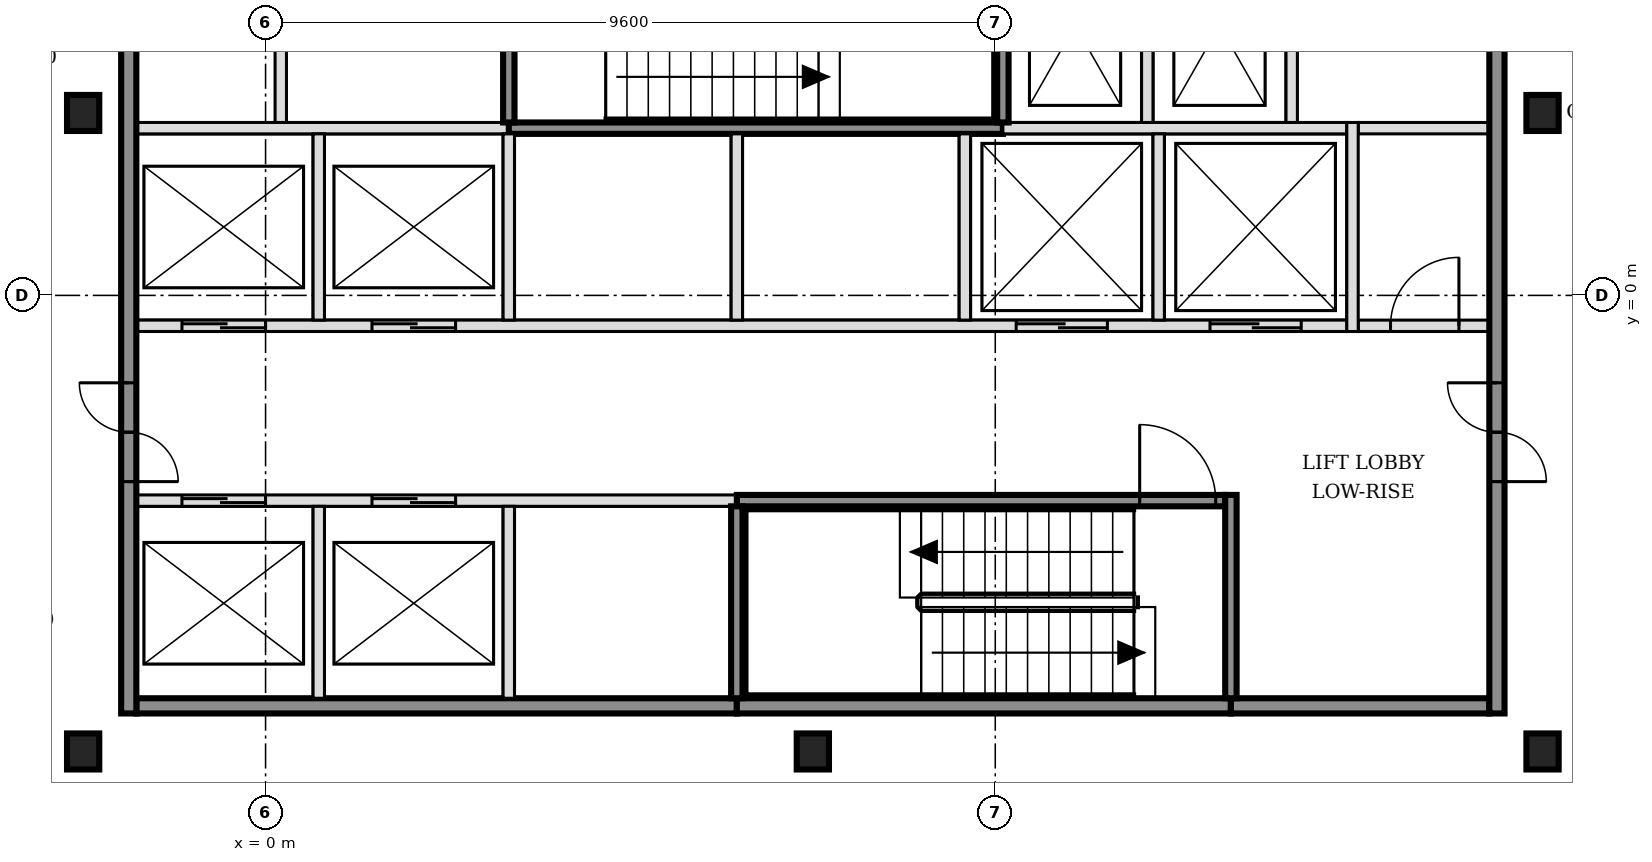
"""IFC4 building model, lengths in metres.
Left out: names, types, materials, properties, quantities, classifications, styles, units other than length and angle.
Written with IfcOpenShell. Run it as: python <this file> out.ifc"""

import sys

from ifc_helpers import new_model, si_unit, direction, frame, frame_2d, origin, origin_2d, place, context, subcontext, project, spatial, rectangle, i_section, extrude, element, fill, save


model = new_model("IFC4")
c1 = context("Model", 3, precision=1e-05, world=origin(), true_north=direction((0.0, 1.0)))
c2 = subcontext(c1, "Body", "Model", "MODEL_VIEW")
j1 = project(units=[si_unit("LENGTHUNIT", "METRE"), si_unit("PLANEANGLEUNIT", "RADIAN")], contexts=[c1])
p1 = place(None, origin())
s1 = spatial("IfcSite", under=j1, at=p1, CompositionType="ELEMENT")
p2 = place(p1, origin())
s2 = spatial("IfcBuilding", under=s1, at=p2, CompositionType="ELEMENT")
p3 = place(p2, frame((0.0, 0.0, 112.2)))
s3 = spatial("IfcBuildingStorey", under=s2, at=p3, CompositionType="ELEMENT", Elevation=112.2)
for number, where, z_axis, x_axis in (
    (1, (-2.4, -6.0, -0.15), (0.0, 0.0, 1.0), (1.0, 0.0, 0.0)),
    (2, (7.2, -6.0, -0.15), (0.0, 0.0, 1.0), (1.0, 0.0, 0.0)),
    (3, (16.8, -6.0, -0.15), (0.0, 0.0, 1.0), (1.0, 0.0, 0.0)),
    (4, (-2.4, 2.4, -0.15), (0.0, 0.0, 1.0), (1.0, 0.0, 0.0)),
    (5, (16.8, 2.4, -0.15), (0.0, 0.0, 1.0), (1.0, 0.0, 0.0)),
):
    element("IfcColumn", number, at=place(p3, frame(where, z_axis=z_axis, x_axis=x_axis)), inside=s3, PredefinedType="COLUMN", context=c2, shape_type="SweptSolid", body=[
        extrude(i_section(OverallWidth=0.424, OverallDepth=0.474, WebThickness=0.048, FlangeThickness=0.077, FilletRadius=0.015, at=origin_2d()), origin(), (0.0, 0.0, 1.0), 3.6),
    ])
p4 = place(p3, frame((-1.7, -5.4, 0.0), z_axis=(0.0, 0.0, 1.0), x_axis=(1.0, 0.0, 0.0)))
e6 = element("IfcWall", 6, at=p4, inside=s3, PredefinedType="SOLIDWALL", context=c2, shape_type="SweptSolid", body=[
    extrude(rectangle(XDim=7.9, YDim=0.2, at=frame_2d((3.95, 0.0))), origin(), (0.0, 0.0, 1.0), 3.45),
])
p5 = place(p3, frame((6.2, -5.4, 0.0), z_axis=(0.0, 0.0, 1.0), x_axis=(1.0, 0.0, 0.0)))
e7 = element("IfcWall", 7, at=p5, inside=s3, PredefinedType="SOLIDWALL", context=c2, shape_type="SweptSolid", body=[
    extrude(rectangle(XDim=6.5, YDim=0.2, at=frame_2d((3.25, 0.0))), origin(), (0.0, 0.0, 1.0), 3.45),
])
p6 = place(p3, frame((12.7, -5.4, 0.0), z_axis=(0.0, 0.0, 1.0), x_axis=(1.0, 0.0, 0.0)))
e8 = element("IfcWall", 8, at=p6, inside=s3, PredefinedType="SOLIDWALL", context=c2, shape_type="SweptSolid", body=[
    extrude(rectangle(XDim=3.4, YDim=0.2, at=frame_2d((1.7, 0.0))), origin(), (0.0, 0.0, 1.0), 3.45),
])
p7 = place(p3, frame((-1.7, -2.7, 0.0), z_axis=(0.0, 0.0, 1.0), x_axis=(1.0, 0.0, 0.0)))
e9 = element("IfcWall", 9, at=p7, inside=s3, PredefinedType="SOLIDWALL", context=c2, shape_type="SweptSolid", body=[
    extrude(rectangle(XDim=7.9, YDim=0.15, at=frame_2d((3.95, 0.0))), origin(), (0.0, 0.0, 1.0), 3.45),
])
p8 = place(p7, frame((0.6, 0.0, 0.0)))
e10 = element("IfcOpeningElement", 10, at=p8, cuts=e9, PredefinedType="OPENING", context=c2, shape_type="SweptSolid", body=[
    extrude(rectangle(XDim=1.1, YDim=2.1, at=frame_2d((0.55, 1.05))), frame((0.0, 0.085, 0.0), z_axis=(0.0, -1.0, 0.0), x_axis=(1.0, 0.0, 0.0)), (0.0, 0.0, 1.0), 0.17),
])
p9 = place(p7, frame((3.1, 0.0, 0.0)))
e11 = element("IfcOpeningElement", 11, at=p9, cuts=e9, PredefinedType="OPENING", context=c2, shape_type="SweptSolid", body=[
    extrude(rectangle(XDim=1.1, YDim=2.1, at=frame_2d((0.55, 1.05))), frame((0.0, 0.085, 0.0), z_axis=(0.0, -1.0, 0.0), x_axis=(1.0, 0.0, 0.0)), (0.0, 0.0, 1.0), 0.17),
])
p10 = place(p3, frame((6.2, -2.7, 0.0), z_axis=(0.0, 0.0, 1.0), x_axis=(1.0, 0.0, 0.0)))
e12 = element("IfcWall", 12, at=p10, inside=s3, PredefinedType="SOLIDWALL", context=c2, shape_type="SweptSolid", body=[
    extrude(rectangle(XDim=6.425, YDim=0.15, at=frame_2d((3.212, 0.0))), origin(), (0.0, 0.0, 1.0), 3.45),
])
p11 = place(p10, frame((5.3, 0.0, 0.0)))
e13 = element("IfcOpeningElement", 13, at=p11, cuts=e12, PredefinedType="OPENING", context=c2, shape_type="SweptSolid", body=[
    extrude(rectangle(XDim=1.0, YDim=2.1, at=frame_2d((0.5, 1.05))), frame((0.0, 0.085, 0.0), z_axis=(0.0, -1.0, 0.0), x_axis=(1.0, 0.0, 0.0)), (0.0, 0.0, 1.0), 0.17),
])
p12 = place(p3, frame((-1.7, -0.4, 0.0), z_axis=(0.0, 0.0, 1.0), x_axis=(1.0, 0.0, 0.0)))
e14 = element("IfcWall", 14, at=p12, inside=s3, PredefinedType="SOLIDWALL", context=c2, shape_type="SweptSolid", body=[
    extrude(rectangle(XDim=15.925, YDim=0.15, at=frame_2d((7.962, 0.0))), origin(), (0.0, 0.0, 1.0), 3.45),
])
p13 = place(p12, frame((0.6, 0.0, 0.0)))
e15 = element("IfcOpeningElement", 15, at=p13, cuts=e14, PredefinedType="OPENING", context=c2, shape_type="SweptSolid", body=[
    extrude(rectangle(XDim=1.1, YDim=2.1, at=frame_2d((0.55, 1.05))), frame((0.0, 0.085, 0.0), z_axis=(0.0, -1.0, 0.0), x_axis=(1.0, 0.0, 0.0)), (0.0, 0.0, 1.0), 0.17),
])
p14 = place(p12, frame((3.1, 0.0, 0.0)))
e16 = element("IfcOpeningElement", 16, at=p14, cuts=e14, PredefinedType="OPENING", context=c2, shape_type="SweptSolid", body=[
    extrude(rectangle(XDim=1.1, YDim=2.1, at=frame_2d((0.55, 1.05))), frame((0.0, 0.085, 0.0), z_axis=(0.0, -1.0, 0.0), x_axis=(1.0, 0.0, 0.0)), (0.0, 0.0, 1.0), 0.17),
])
p15 = place(p12, frame((11.575, 0.0, 0.0)))
e17 = element("IfcOpeningElement", 17, at=p15, cuts=e14, PredefinedType="OPENING", context=c2, shape_type="SweptSolid", body=[
    extrude(rectangle(XDim=1.2, YDim=2.1, at=frame_2d((0.6, 1.05))), frame((0.0, 0.085, 0.0), z_axis=(0.0, -1.0, 0.0), x_axis=(1.0, 0.0, 0.0)), (0.0, 0.0, 1.0), 0.17),
])
p16 = place(p12, frame((14.125, 0.0, 0.0)))
e18 = element("IfcOpeningElement", 18, at=p16, cuts=e14, PredefinedType="OPENING", context=c2, shape_type="SweptSolid", body=[
    extrude(rectangle(XDim=1.2, YDim=2.1, at=frame_2d((0.6, 1.05))), frame((0.0, 0.085, 0.0), z_axis=(0.0, -1.0, 0.0), x_axis=(1.0, 0.0, 0.0)), (0.0, 0.0, 1.0), 0.17),
])
p17 = place(p3, frame((14.375, -0.4, 0.0), z_axis=(0.0, 0.0, 1.0), x_axis=(1.0, 0.0, 0.0)))
e19 = element("IfcWall", 19, at=p17, inside=s3, PredefinedType="PARTITIONING", context=c2, shape_type="SweptSolid", body=[
    extrude(rectangle(XDim=1.725, YDim=0.15, at=frame_2d((0.863, 0.0))), origin(), (0.0, 0.0, 1.0), 3.45),
])
p18 = place(p17, frame((0.425, 0.0, 0.0)))
e20 = element("IfcOpeningElement", 20, at=p18, cuts=e19, PredefinedType="OPENING", context=c2, shape_type="SweptSolid", body=[
    extrude(rectangle(XDim=0.9, YDim=2.1, at=frame_2d((0.45, 1.05))), frame((0.0, 0.085, 0.0), z_axis=(0.0, -1.0, 0.0), x_axis=(1.0, 0.0, 0.0)), (0.0, 0.0, 1.0), 0.17),
])
p19 = place(p3, frame((-1.7, 2.2, 0.0), z_axis=(0.0, 0.0, 1.0), x_axis=(1.0, 0.0, 0.0)))
e21 = element("IfcWall", 21, at=p19, inside=s3, PredefinedType="SOLIDWALL", context=c2, shape_type="SweptSolid", body=[
    extrude(rectangle(XDim=4.9, YDim=0.15, at=frame_2d((2.45, 0.0))), origin(), (0.0, 0.0, 1.0), 3.45),
])
p20 = place(p3, frame((3.2, 2.2, 0.0), z_axis=(0.0, 0.0, 1.0), x_axis=(1.0, 0.0, 0.0)))
e22 = element("IfcWall", 22, at=p20, inside=s3, PredefinedType="SOLIDWALL", context=c2, shape_type="SweptSolid", body=[
    extrude(rectangle(XDim=6.5, YDim=0.15, at=frame_2d((3.25, 0.0))), origin(), (0.0, 0.0, 1.0), 3.45),
])
p21 = place(p3, frame((9.7, 2.2, 0.0), z_axis=(0.0, 0.0, 1.0), x_axis=(1.0, 0.0, 0.0)))
e23 = element("IfcWall", 23, at=p21, inside=s3, PredefinedType="SOLIDWALL", context=c2, shape_type="SweptSolid", body=[
    extrude(rectangle(XDim=4.525, YDim=0.15, at=frame_2d((2.263, 0.0))), origin(), (0.0, 0.0, 1.0), 3.45),
])
p22 = place(p3, frame((14.375, 2.2, 0.0), z_axis=(0.0, 0.0, 1.0), x_axis=(1.0, 0.0, 0.0)))
e24 = element("IfcWall", 24, at=p22, inside=s3, PredefinedType="PARTITIONING", context=c2, shape_type="SweptSolid", body=[
    extrude(rectangle(XDim=1.725, YDim=0.15, at=frame_2d((0.863, 0.0))), origin(), (0.0, 0.0, 1.0), 3.45),
])
p23 = place(p3, frame((-1.8, -5.5, 0.0), z_axis=(0.0, 0.0, 1.0), x_axis=(0.0, 1.0, 0.0)))
e25 = element("IfcWall", 25, at=p23, inside=s3, PredefinedType="SOLIDWALL", context=c2, shape_type="SweptSolid", body=[
    extrude(rectangle(XDim=15.8, YDim=0.2, at=frame_2d((7.9, 0.0))), origin(), (0.0, 0.0, 1.0), 3.45),
])
p24 = place(p23, frame((3.05, 0.0, 0.0)))
e26 = element("IfcOpeningElement", 26, at=p24, cuts=e25, PredefinedType="OPENING", context=c2, shape_type="SweptSolid", body=[
    extrude(rectangle(XDim=1.3, YDim=2.1, at=frame_2d((0.65, 1.05))), frame((0.0, 0.11, 0.0), z_axis=(0.0, -1.0, 0.0), x_axis=(1.0, 0.0, 0.0)), (0.0, 0.0, 1.0), 0.22),
])
p25 = place(p23, frame((11.45, 0.0, 0.0)))
e27 = element("IfcOpeningElement", 27, at=p25, cuts=e25, PredefinedType="OPENING", context=c2, shape_type="SweptSolid", body=[
    extrude(rectangle(XDim=1.3, YDim=2.1, at=frame_2d((0.65, 1.05))), frame((0.0, 0.11, 0.0), z_axis=(0.0, -1.0, 0.0), x_axis=(1.0, 0.0, 0.0)), (0.0, 0.0, 1.0), 0.22),
])
p26 = place(p3, frame((0.2, 2.275, 0.0), z_axis=(0.0, 0.0, 1.0), x_axis=(0.0, 1.0, 0.0)))
e28 = element("IfcWall", 28, at=p26, inside=s3, PredefinedType="PARTITIONING", context=c2, shape_type="SweptSolid", body=[
    extrude(rectangle(XDim=2.55, YDim=0.15, at=frame_2d((1.275, 0.0))), origin(), (0.0, 0.0, 1.0), 3.45),
])
p27 = place(p3, frame((0.7, -5.3, 0.0), z_axis=(0.0, 0.0, 1.0), x_axis=(0.0, 1.0, 0.0)))
e29 = element("IfcWall", 29, at=p27, inside=s3, PredefinedType="SOLIDWALL", context=c2, shape_type="SweptSolid", body=[
    extrude(rectangle(XDim=2.525, YDim=0.15, at=frame_2d((1.263, 0.0))), origin(), (0.0, 0.0, 1.0), 3.45),
])
p28 = place(p3, frame((0.7, -0.325, 0.0), z_axis=(0.0, 0.0, 1.0), x_axis=(0.0, 1.0, 0.0)))
e30 = element("IfcWall", 30, at=p28, inside=s3, PredefinedType="SOLIDWALL", context=c2, shape_type="SweptSolid", body=[
    extrude(rectangle(XDim=2.45, YDim=0.15, at=frame_2d((1.225, 0.0))), origin(), (0.0, 0.0, 1.0), 3.45),
])
p29 = place(p3, frame((3.2, -5.3, 0.0), z_axis=(0.0, 0.0, 1.0), x_axis=(0.0, 1.0, 0.0)))
e31 = element("IfcWall", 31, at=p29, inside=s3, PredefinedType="SOLIDWALL", context=c2, shape_type="SweptSolid", body=[
    extrude(rectangle(XDim=2.525, YDim=0.15, at=frame_2d((1.263, 0.0))), origin(), (0.0, 0.0, 1.0), 3.45),
])
p30 = place(p3, frame((3.2, -0.325, 0.0), z_axis=(0.0, 0.0, 1.0), x_axis=(0.0, 1.0, 0.0)))
e32 = element("IfcWall", 32, at=p30, inside=s3, PredefinedType="SOLIDWALL", context=c2, shape_type="SweptSolid", body=[
    extrude(rectangle(XDim=2.45, YDim=0.15, at=frame_2d((1.225, 0.0))), origin(), (0.0, 0.0, 1.0), 3.45),
])
p31 = place(p3, frame((3.2, 2.275, 0.0), z_axis=(0.0, 0.0, 1.0), x_axis=(0.0, 1.0, 0.0)))
e33 = element("IfcWall", 33, at=p31, inside=s3, PredefinedType="SOLIDWALL", context=c2, shape_type="SweptSolid", body=[
    extrude(rectangle(XDim=2.7, YDim=0.15, at=frame_2d((1.35, 0.0))), origin(), (0.0, 0.0, 1.0), 3.45),
])
p32 = place(p3, frame((6.2, -5.3, 0.0), z_axis=(0.0, 0.0, 1.0), x_axis=(0.0, 1.0, 0.0)))
e34 = element("IfcWall", 34, at=p32, inside=s3, PredefinedType="SOLIDWALL", context=c2, shape_type="SweptSolid", body=[
    extrude(rectangle(XDim=2.525, YDim=0.15, at=frame_2d((1.263, 0.0))), origin(), (0.0, 0.0, 1.0), 3.45),
])
for number, where, z_axis, x_axis in (
    (35, (6.2, -0.325, 0.0), (0.0, 0.0, 1.0), (0.0, 1.0, 0.0)),
    (36, (9.2, -0.325, 0.0), (0.0, 0.0, 1.0), (0.0, 1.0, 0.0)),
):
    element("IfcWall", number, at=place(p3, frame(where, z_axis=z_axis, x_axis=x_axis)), inside=s3, PredefinedType="SOLIDWALL", context=c2, shape_type="SweptSolid", body=[
        extrude(rectangle(XDim=2.45, YDim=0.15, at=frame_2d((1.225, 0.0))), origin(), (0.0, 0.0, 1.0), 3.45),
    ])
for number, where, z_axis, x_axis in (
    (37, (9.7, 2.275, 0.0), (0.0, 0.0, 1.0), (0.0, 1.0, 0.0)),
    (38, (11.6, 2.275, 0.0), (0.0, 0.0, 1.0), (0.0, 1.0, 0.0)),
):
    element("IfcWall", number, at=place(p3, frame(where, z_axis=z_axis, x_axis=x_axis)), inside=s3, PredefinedType="SOLIDWALL", context=c2, shape_type="SweptSolid", body=[
        extrude(rectangle(XDim=2.55, YDim=0.15, at=frame_2d((1.275, 0.0))), origin(), (0.0, 0.0, 1.0), 3.45),
    ])
p33 = place(p3, frame((11.75, -0.325, 0.0), z_axis=(0.0, 0.0, 1.0), x_axis=(0.0, 1.0, 0.0)))
e39 = element("IfcWall", 39, at=p33, inside=s3, PredefinedType="SOLIDWALL", context=c2, shape_type="SweptSolid", body=[
    extrude(rectangle(XDim=2.45, YDim=0.15, at=frame_2d((1.225, 0.0))), origin(), (0.0, 0.0, 1.0), 3.45),
])
p34 = place(p3, frame((12.7, -5.3, 0.0), z_axis=(0.0, 0.0, 1.0), x_axis=(0.0, 1.0, 0.0)))
e40 = element("IfcWall", 40, at=p34, inside=s3, PredefinedType="SOLIDWALL", context=c2, shape_type="SweptSolid", body=[
    extrude(rectangle(XDim=2.675, YDim=0.15, at=frame_2d((1.337, 0.0))), origin(), (0.0, 0.0, 1.0), 3.45),
])
p35 = place(p3, frame((13.5, 2.275, 0.0), z_axis=(0.0, 0.0, 1.0), x_axis=(0.0, 1.0, 0.0)))
e41 = element("IfcWall", 41, at=p35, inside=s3, PredefinedType="SOLIDWALL", context=c2, shape_type="SweptSolid", body=[
    extrude(rectangle(XDim=2.55, YDim=0.15, at=frame_2d((1.275, 0.0))), origin(), (0.0, 0.0, 1.0), 3.45),
])
p36 = place(p3, frame((14.3, -0.475, 0.0), z_axis=(0.0, 0.0, 1.0), x_axis=(0.0, 1.0, 0.0)))
e42 = element("IfcWall", 42, at=p36, inside=s3, PredefinedType="SOLIDWALL", context=c2, shape_type="SweptSolid", body=[
    extrude(rectangle(XDim=2.75, YDim=0.15, at=frame_2d((1.375, 0.0))), origin(), (0.0, 0.0, 1.0), 3.45),
])
p37 = place(p3, frame((16.2, -5.5, 0.0), z_axis=(0.0, 0.0, 1.0), x_axis=(0.0, 1.0, 0.0)))
e43 = element("IfcWall", 43, at=p37, inside=s3, PredefinedType="SOLIDWALL", context=c2, shape_type="SweptSolid", body=[
    extrude(rectangle(XDim=15.8, YDim=0.2, at=frame_2d((7.9, 0.0))), origin(), (0.0, 0.0, 1.0), 3.45),
])
p38 = place(p37, frame((3.05, 0.0, 0.0)))
e44 = element("IfcOpeningElement", 44, at=p38, cuts=e43, PredefinedType="OPENING", context=c2, shape_type="SweptSolid", body=[
    extrude(rectangle(XDim=1.3, YDim=2.1, at=frame_2d((0.65, 1.05))), frame((0.0, 0.11, 0.0), z_axis=(0.0, -1.0, 0.0), x_axis=(1.0, 0.0, 0.0)), (0.0, 0.0, 1.0), 0.22),
])
p39 = place(p37, frame((11.45, 0.0, 0.0)))
e45 = element("IfcOpeningElement", 45, at=p39, cuts=e43, PredefinedType="OPENING", context=c2, shape_type="SweptSolid", body=[
    extrude(rectangle(XDim=1.3, YDim=2.1, at=frame_2d((0.65, 1.05))), frame((0.0, 0.11, 0.0), z_axis=(0.0, -1.0, 0.0), x_axis=(1.0, 0.0, 0.0)), (0.0, 0.0, 1.0), 0.22),
])
p40 = place(p8, origin())
e46 = element("IfcDoor", 46, at=p40, inside=s3, OperationType="DOUBLE_DOOR_SLIDING", PredefinedType="DOOR", context=c2, shape_type="SweptSolid", body=[
    extrude(rectangle(XDim=1.1, YDim=2.1, at=frame_2d((0.55, 1.05))), frame((0.0, 0.025, 0.0), z_axis=(0.0, -1.0, 0.0), x_axis=(1.0, 0.0, 0.0)), (0.0, 0.0, 1.0), 0.05),
])
fill(e10, e46)
p41 = place(p9, origin())
e47 = element("IfcDoor", 47, at=p41, inside=s3, OperationType="DOUBLE_DOOR_SLIDING", PredefinedType="DOOR", context=c2, shape_type="SweptSolid", body=[
    extrude(rectangle(XDim=1.1, YDim=2.1, at=frame_2d((0.55, 1.05))), frame((0.0, 0.025, 0.0), z_axis=(0.0, -1.0, 0.0), x_axis=(1.0, 0.0, 0.0)), (0.0, 0.0, 1.0), 0.05),
])
fill(e11, e47)
p42 = place(p13, origin())
e48 = element("IfcDoor", 48, at=p42, inside=s3, OperationType="DOUBLE_DOOR_SLIDING", PredefinedType="DOOR", context=c2, shape_type="SweptSolid", body=[
    extrude(rectangle(XDim=1.1, YDim=2.1, at=frame_2d((0.55, 1.05))), frame((0.0, 0.025, 0.0), z_axis=(0.0, -1.0, 0.0), x_axis=(1.0, 0.0, 0.0)), (0.0, 0.0, 1.0), 0.05),
])
fill(e15, e48)
p43 = place(p14, origin())
e49 = element("IfcDoor", 49, at=p43, inside=s3, OperationType="DOUBLE_DOOR_SLIDING", PredefinedType="DOOR", context=c2, shape_type="SweptSolid", body=[
    extrude(rectangle(XDim=1.1, YDim=2.1, at=frame_2d((0.55, 1.05))), frame((0.0, 0.025, 0.0), z_axis=(0.0, -1.0, 0.0), x_axis=(1.0, 0.0, 0.0)), (0.0, 0.0, 1.0), 0.05),
])
fill(e16, e49)
p44 = place(p15, origin())
e50 = element("IfcDoor", 50, at=p44, inside=s3, OperationType="DOUBLE_DOOR_SLIDING", PredefinedType="DOOR", context=c2, shape_type="SweptSolid", body=[
    extrude(rectangle(XDim=1.2, YDim=2.1, at=frame_2d((0.6, 1.05))), frame((0.0, 0.025, 0.0), z_axis=(0.0, -1.0, 0.0), x_axis=(1.0, 0.0, 0.0)), (0.0, 0.0, 1.0), 0.05),
])
fill(e17, e50)
p45 = place(p16, origin())
e51 = element("IfcDoor", 51, at=p45, inside=s3, OperationType="DOUBLE_DOOR_SLIDING", PredefinedType="DOOR", context=c2, shape_type="SweptSolid", body=[
    extrude(rectangle(XDim=1.2, YDim=2.1, at=frame_2d((0.6, 1.05))), frame((0.0, 0.025, 0.0), z_axis=(0.0, -1.0, 0.0), x_axis=(1.0, 0.0, 0.0)), (0.0, 0.0, 1.0), 0.05),
])
fill(e18, e51)
p46 = place(p11, origin())
e52 = element("IfcDoor", 52, at=p46, inside=s3, OperationType="SINGLE_SWING_LEFT", PredefinedType="DOOR", context=c2, shape_type="SweptSolid", body=[
    extrude(rectangle(XDim=1.0, YDim=2.1, at=frame_2d((0.5, 1.05))), frame((0.0, 0.025, 0.0), z_axis=(0.0, -1.0, 0.0), x_axis=(1.0, 0.0, 0.0)), (0.0, 0.0, 1.0), 0.05),
])
fill(e13, e52)
p47 = place(p24, origin())
e53 = element("IfcDoor", 53, at=p47, inside=s3, OperationType="DOUBLE_DOOR_SINGLE_SWING", PredefinedType="DOOR", context=c2, shape_type="SweptSolid", body=[
    extrude(rectangle(XDim=1.3, YDim=2.1, at=frame_2d((0.65, 1.05))), frame((0.0, 0.025, 0.0), z_axis=(0.0, -1.0, 0.0), x_axis=(1.0, 0.0, 0.0)), (0.0, 0.0, 1.0), 0.05),
])
fill(e26, e53)
p48 = place(p38, origin())
e54 = element("IfcDoor", 54, at=p48, inside=s3, OperationType="DOUBLE_DOOR_SINGLE_SWING", PredefinedType="DOOR", context=c2, shape_type="SweptSolid", body=[
    extrude(rectangle(XDim=1.3, YDim=2.1, at=frame_2d((0.65, 1.05))), frame((0.0, 0.025, 0.0), z_axis=(0.0, -1.0, 0.0), x_axis=(1.0, 0.0, 0.0)), (0.0, 0.0, 1.0), 0.05),
])
fill(e44, e54)
p49 = place(p18, origin())
e55 = element("IfcDoor", 55, at=p49, inside=s3, OperationType="SINGLE_SWING_RIGHT", PredefinedType="DOOR", context=c2, shape_type="SweptSolid", body=[
    extrude(rectangle(XDim=0.9, YDim=2.1, at=frame_2d((0.45, 1.05))), frame((0.0, 0.025, 0.0), z_axis=(0.0, -1.0, 0.0), x_axis=(1.0, 0.0, 0.0)), (0.0, 0.0, 1.0), 0.05),
])
fill(e20, e55)
save(model, sys.argv[1])
